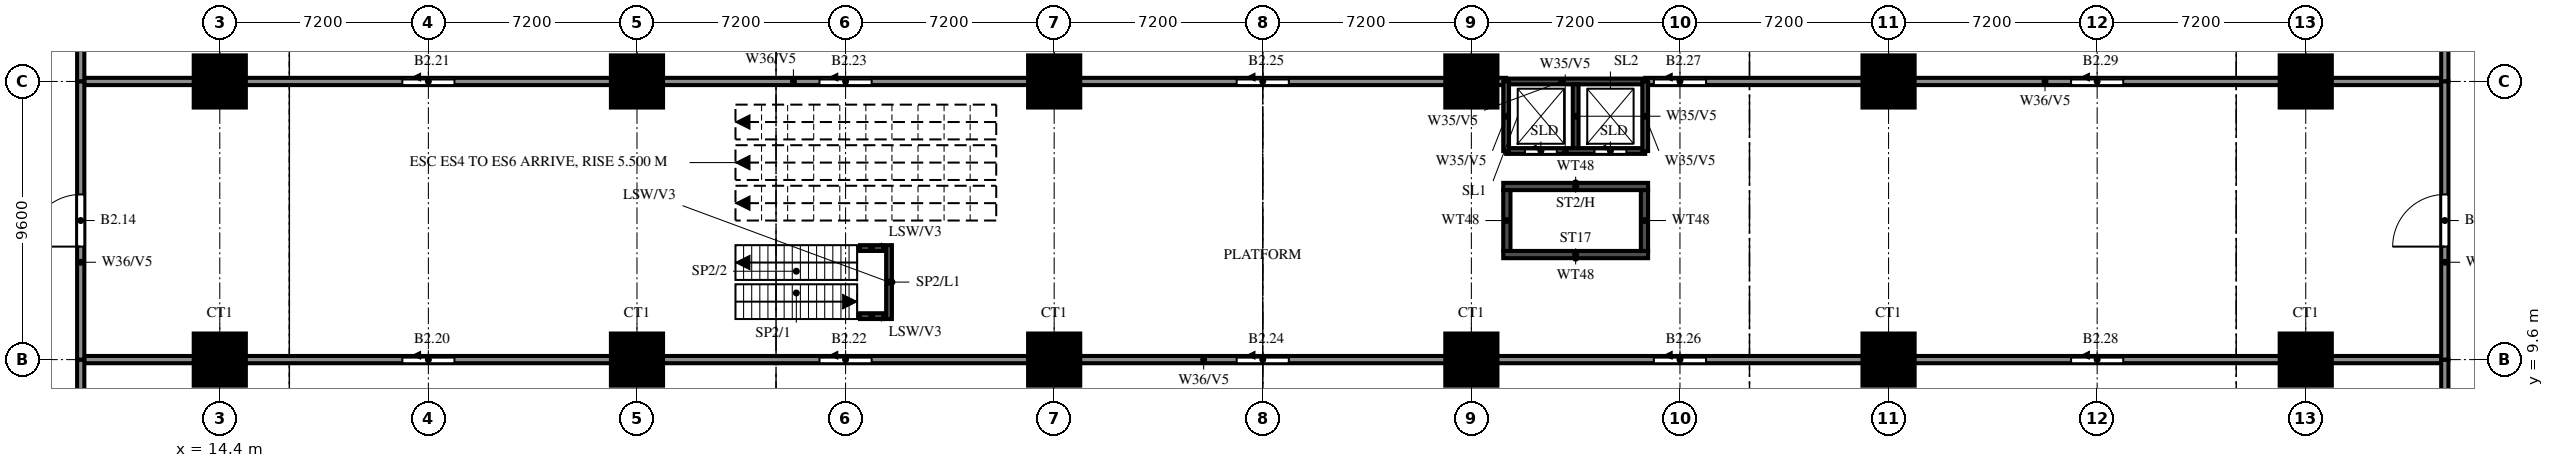
"""IFC4 building model, lengths in metres.
Left out: names, types, materials, properties, quantities, classifications, styles, units other than length and angle.
Written with IfcOpenShell. Run it as: python <this file> out.ifc"""

import sys

from ifc_helpers import new_model, si_unit, direction, frame, frame_2d, origin, origin_2d, place, context, subcontext, project, spatial, rectangle, extrude, source, transform, mapped, element, fill, save


model = new_model("IFC4")
c1 = context("Model", 3, precision=1e-05, world=origin(), true_north=direction((0.0, 1.0)))
c2 = subcontext(c1, "Body", "Model", "MODEL_VIEW")
j1 = project(units=[si_unit("LENGTHUNIT", "METRE"), si_unit("PLANEANGLEUNIT", "RADIAN")], contexts=[c1])
p1 = place(None, origin())
s1 = spatial("IfcSite", under=j1, at=p1, CompositionType="ELEMENT")
p2 = place(p1, origin())
s2 = spatial("IfcBuilding", under=s1, at=p2, CompositionType="ELEMENT")
p3 = place(p2, frame((0.0, 0.0, -11.4)))
s3 = spatial("IfcBuildingStorey", under=s2, at=p3, CompositionType="ELEMENT", Elevation=-11.4)
m1 = source(origin(), c2, "Body", "SweptSolid", [
    extrude(rectangle(XDim=1.8, YDim=1.8, at=origin_2d()), origin(), (0.0, 0.0, 1.0), 5.6),
])
for number, where, z_axis, x_axis in (
    (1, (14.4, 9.6, 0.0), (0.0, 0.0, 1.0), (1.0, 0.0, 0.0)),
    (2, (28.8, 9.6, 0.0), (0.0, 0.0, 1.0), (1.0, 0.0, 0.0)),
    (3, (43.2, 9.6, 0.0), (0.0, 0.0, 1.0), (1.0, 0.0, 0.0)),
    (4, (57.6, 9.6, 0.0), (0.0, 0.0, 1.0), (1.0, 0.0, 0.0)),
    (5, (72.0, 9.6, 0.0), (0.0, 0.0, 1.0), (1.0, 0.0, 0.0)),
    (6, (86.4, 9.6, 0.0), (0.0, 0.0, 1.0), (1.0, 0.0, 0.0)),
    (7, (14.4, 19.2, 0.0), (0.0, 0.0, 1.0), (1.0, 0.0, 0.0)),
    (8, (28.8, 19.2, 0.0), (0.0, 0.0, 1.0), (1.0, 0.0, 0.0)),
    (9, (43.2, 19.2, 0.0), (0.0, 0.0, 1.0), (1.0, 0.0, 0.0)),
    (10, (57.6, 19.2, 0.0), (0.0, 0.0, 1.0), (1.0, 0.0, 0.0)),
    (11, (72.0, 19.2, 0.0), (0.0, 0.0, 1.0), (1.0, 0.0, 0.0)),
    (12, (86.4, 19.2, 0.0), (0.0, 0.0, 1.0), (1.0, 0.0, 0.0)),
):
    element("IfcColumn", number, at=place(p3, frame(where, z_axis=z_axis, x_axis=x_axis)), inside=s3, PredefinedType="COLUMN", context=c2, shape_type="MappedRepresentation", body=[
        mapped(m1, transform((0.0, 0.0, 0.0))),
    ])
for number, where, z_axis, x_axis in (
    (13, (58.7, 13.225, -1.4), (0.0, 0.0, 1.0), (1.0, 0.0, 0.0)),
    (14, (58.7, 15.575, -1.4), (0.0, 0.0, 1.0), (1.0, 0.0, 0.0)),
):
    element("IfcWall", number, at=place(p3, frame(where, z_axis=z_axis, x_axis=x_axis)), inside=s3, PredefinedType="SHEAR", context=c2, shape_type="SweptSolid", body=[
        extrude(rectangle(XDim=5.0, YDim=0.25, at=frame_2d((2.5, 0.0))), origin(), (0.0, 0.0, 1.0), 1.4),
    ])
for number, where, z_axis, x_axis in (
    (15, (58.825, 13.35, -1.4), (0.0, 0.0, 1.0), (0.0, 1.0, 0.0)),
    (16, (63.575, 13.35, -1.4), (0.0, 0.0, 1.0), (0.0, 1.0, 0.0)),
):
    element("IfcWall", number, at=place(p3, frame(where, z_axis=z_axis, x_axis=x_axis)), inside=s3, PredefinedType="SHEAR", context=c2, shape_type="SweptSolid", body=[
        extrude(rectangle(XDim=2.1, YDim=0.25, at=frame_2d((1.05, 0.0))), origin(), (0.0, 0.0, 1.0), 1.4),
    ])
for number, where, z_axis, x_axis in (
    (17, (36.5, 11.1, 0.0), (0.0, 0.0, 1.0), (1.0, 0.0, 0.0)),
    (18, (36.5, 13.45, 0.0), (0.0, 0.0, 1.0), (1.0, 0.0, 0.0)),
):
    element("IfcWall", number, at=place(p3, frame(where, z_axis=z_axis, x_axis=x_axis)), inside=s3, PredefinedType="SOLIDWALL", context=c2, shape_type="SweptSolid", body=[
        extrude(rectangle(XDim=0.8, YDim=0.2, at=frame_2d((0.4, 0.0))), origin(), (0.0, 0.0, 1.0), 2.8),
    ])
p4 = place(p3, frame((37.5, 11.0, 0.0), z_axis=(0.0, 0.0, 1.0), x_axis=(0.0, 1.0, 0.0)))
e19 = element("IfcWall", 19, at=p4, inside=s3, PredefinedType="SOLIDWALL", context=c2, shape_type="SweptSolid", body=[
    extrude(rectangle(XDim=2.55, YDim=0.2, at=frame_2d((1.275, 0.0))), origin(), (0.0, 0.0, 1.0), 2.8),
])
p5 = place(p3, frame((9.6, 9.6, 0.0), z_axis=(0.0, 0.0, 1.0), x_axis=(1.0, 0.0, 0.0)))
e20 = element("IfcWall", 20, at=p5, inside=s3, PredefinedType="SOLIDWALL", context=c2, shape_type="SweptSolid", body=[
    extrude(rectangle(XDim=81.6, YDim=0.25, at=frame_2d((40.8, 0.0))), origin(), (0.0, 0.0, 1.0), 2.2),
])
p6 = place(p5, frame((11.1, 0.0, 0.0)))
e21 = element("IfcOpeningElement", 21, at=p6, cuts=e20, PredefinedType="OPENING", context=c2, shape_type="SweptSolid", body=[
    extrude(rectangle(XDim=1.8, YDim=2.1, at=frame_2d((0.9, 1.05))), frame((0.0, 0.135, 0.0), z_axis=(0.0, -1.0, 0.0), x_axis=(1.0, 0.0, 0.0)), (0.0, 0.0, 1.0), 0.27),
])
p7 = place(p5, frame((25.5, 0.0, 0.0)))
e22 = element("IfcOpeningElement", 22, at=p7, cuts=e20, PredefinedType="OPENING", context=c2, shape_type="SweptSolid", body=[
    extrude(rectangle(XDim=1.8, YDim=2.1, at=frame_2d((0.9, 1.05))), frame((0.0, 0.135, 0.0), z_axis=(0.0, -1.0, 0.0), x_axis=(1.0, 0.0, 0.0)), (0.0, 0.0, 1.0), 0.27),
])
p8 = place(p5, frame((39.9, 0.0, 0.0)))
e23 = element("IfcOpeningElement", 23, at=p8, cuts=e20, PredefinedType="OPENING", context=c2, shape_type="SweptSolid", body=[
    extrude(rectangle(XDim=1.8, YDim=2.1, at=frame_2d((0.9, 1.05))), frame((0.0, 0.135, 0.0), z_axis=(0.0, -1.0, 0.0), x_axis=(1.0, 0.0, 0.0)), (0.0, 0.0, 1.0), 0.27),
])
p9 = place(p5, frame((54.3, 0.0, 0.0)))
e24 = element("IfcOpeningElement", 24, at=p9, cuts=e20, PredefinedType="OPENING", context=c2, shape_type="SweptSolid", body=[
    extrude(rectangle(XDim=1.8, YDim=2.1, at=frame_2d((0.9, 1.05))), frame((0.0, 0.135, 0.0), z_axis=(0.0, -1.0, 0.0), x_axis=(1.0, 0.0, 0.0)), (0.0, 0.0, 1.0), 0.27),
])
p10 = place(p5, frame((68.7, 0.0, 0.0)))
e25 = element("IfcOpeningElement", 25, at=p10, cuts=e20, PredefinedType="OPENING", context=c2, shape_type="SweptSolid", body=[
    extrude(rectangle(XDim=1.8, YDim=2.1, at=frame_2d((0.9, 1.05))), frame((0.0, 0.135, 0.0), z_axis=(0.0, -1.0, 0.0), x_axis=(1.0, 0.0, 0.0)), (0.0, 0.0, 1.0), 0.27),
])
p11 = place(p3, frame((58.8, 16.8, 0.0), z_axis=(0.0, 0.0, 1.0), x_axis=(1.0, 0.0, 0.0)))
e26 = element("IfcWall", 26, at=p11, inside=s3, PredefinedType="SOLIDWALL", context=c2, shape_type="SweptSolid", body=[
    extrude(rectangle(XDim=4.8, YDim=0.2, at=frame_2d((2.4, 0.0))), origin(), (0.0, 0.0, 1.0), 5.6),
])
p12 = place(p11, frame((0.65, 0.0, 0.0)))
e27 = element("IfcOpeningElement", 27, at=p12, cuts=e26, PredefinedType="OPENING", context=c2, shape_type="SweptSolid", body=[
    extrude(rectangle(XDim=1.1, YDim=2.1, at=frame_2d((0.55, 1.05))), frame((0.0, 0.11, 0.0), z_axis=(0.0, -1.0, 0.0), x_axis=(1.0, 0.0, 0.0)), (0.0, 0.0, 1.0), 0.22),
])
p13 = place(p11, frame((3.05, 0.0, 0.0)))
e28 = element("IfcOpeningElement", 28, at=p13, cuts=e26, PredefinedType="OPENING", context=c2, shape_type="SweptSolid", body=[
    extrude(rectangle(XDim=1.1, YDim=2.1, at=frame_2d((0.55, 1.05))), frame((0.0, 0.11, 0.0), z_axis=(0.0, -1.0, 0.0), x_axis=(1.0, 0.0, 0.0)), (0.0, 0.0, 1.0), 0.22),
])
p14 = place(p3, frame((58.8, 19.2, 0.0), z_axis=(0.0, 0.0, 1.0), x_axis=(1.0, 0.0, 0.0)))
e29 = element("IfcWall", 29, at=p14, inside=s3, PredefinedType="SOLIDWALL", context=c2, shape_type="SweptSolid", body=[
    extrude(rectangle(XDim=4.8, YDim=0.2, at=frame_2d((2.4, 0.0))), origin(), (0.0, 0.0, 1.0), 5.6),
])
p15 = place(p3, frame((9.6, 19.2, 0.0), z_axis=(0.0, 0.0, 1.0), x_axis=(1.0, 0.0, 0.0)))
e30 = element("IfcWall", 30, at=p15, inside=s3, PredefinedType="SOLIDWALL", context=c2, shape_type="SweptSolid", body=[
    extrude(rectangle(XDim=49.2, YDim=0.25, at=frame_2d((24.6, 0.0))), origin(), (0.0, 0.0, 1.0), 2.2),
])
p16 = place(p15, frame((11.1, 0.0, 0.0)))
e31 = element("IfcOpeningElement", 31, at=p16, cuts=e30, PredefinedType="OPENING", context=c2, shape_type="SweptSolid", body=[
    extrude(rectangle(XDim=1.8, YDim=2.1, at=frame_2d((0.9, 1.05))), frame((0.0, 0.135, 0.0), z_axis=(0.0, -1.0, 0.0), x_axis=(1.0, 0.0, 0.0)), (0.0, 0.0, 1.0), 0.27),
])
p17 = place(p15, frame((25.5, 0.0, 0.0)))
e32 = element("IfcOpeningElement", 32, at=p17, cuts=e30, PredefinedType="OPENING", context=c2, shape_type="SweptSolid", body=[
    extrude(rectangle(XDim=1.8, YDim=2.1, at=frame_2d((0.9, 1.05))), frame((0.0, 0.135, 0.0), z_axis=(0.0, -1.0, 0.0), x_axis=(1.0, 0.0, 0.0)), (0.0, 0.0, 1.0), 0.27),
])
p18 = place(p15, frame((39.9, 0.0, 0.0)))
e33 = element("IfcOpeningElement", 33, at=p18, cuts=e30, PredefinedType="OPENING", context=c2, shape_type="SweptSolid", body=[
    extrude(rectangle(XDim=1.8, YDim=2.1, at=frame_2d((0.9, 1.05))), frame((0.0, 0.135, 0.0), z_axis=(0.0, -1.0, 0.0), x_axis=(1.0, 0.0, 0.0)), (0.0, 0.0, 1.0), 0.27),
])
p19 = place(p3, frame((63.6, 19.2, 0.0), z_axis=(0.0, 0.0, 1.0), x_axis=(1.0, 0.0, 0.0)))
e34 = element("IfcWall", 34, at=p19, inside=s3, PredefinedType="SOLIDWALL", context=c2, shape_type="SweptSolid", body=[
    extrude(rectangle(XDim=27.6, YDim=0.25, at=frame_2d((13.8, 0.0))), origin(), (0.0, 0.0, 1.0), 2.2),
])
p20 = place(p19, frame((0.3, 0.0, 0.0)))
e35 = element("IfcOpeningElement", 35, at=p20, cuts=e34, PredefinedType="OPENING", context=c2, shape_type="SweptSolid", body=[
    extrude(rectangle(XDim=1.8, YDim=2.1, at=frame_2d((0.9, 1.05))), frame((0.0, 0.135, 0.0), z_axis=(0.0, -1.0, 0.0), x_axis=(1.0, 0.0, 0.0)), (0.0, 0.0, 1.0), 0.27),
])
p21 = place(p19, frame((14.7, 0.0, 0.0)))
e36 = element("IfcOpeningElement", 36, at=p21, cuts=e34, PredefinedType="OPENING", context=c2, shape_type="SweptSolid", body=[
    extrude(rectangle(XDim=1.8, YDim=2.1, at=frame_2d((0.9, 1.05))), frame((0.0, 0.135, 0.0), z_axis=(0.0, -1.0, 0.0), x_axis=(1.0, 0.0, 0.0)), (0.0, 0.0, 1.0), 0.27),
])
p22 = place(p3, frame((9.6, 0.2, 0.0), z_axis=(0.0, 0.0, 1.0), x_axis=(0.0, 1.0, 0.0)))
e37 = element("IfcWall", 37, at=p22, inside=s3, PredefinedType="SOLIDWALL", context=c2, shape_type="SweptSolid", body=[
    extrude(rectangle(XDim=9.4, YDim=0.25, at=frame_2d((4.7, 0.0))), origin(), (0.0, 0.0, 1.0), 2.2),
])
p23 = place(p3, frame((9.6, 19.2, 0.0), z_axis=(0.0, 0.0, 1.0), x_axis=(0.0, 1.0, 0.0)))
e38 = element("IfcWall", 38, at=p23, inside=s3, PredefinedType="SOLIDWALL", context=c2, shape_type="SweptSolid", body=[
    extrude(rectangle(XDim=4.8, YDim=0.25, at=frame_2d((2.4, 0.0))), origin(), (0.0, 0.0, 1.0), 2.2),
])
p24 = place(p3, frame((9.6, 9.6, 0.0), z_axis=(0.0, 0.0, 1.0), x_axis=(0.0, 1.0, 0.0)))
e39 = element("IfcWall", 39, at=p24, inside=s3, PredefinedType="SOLIDWALL", context=c2, shape_type="SweptSolid", body=[
    extrude(rectangle(XDim=9.6, YDim=0.25, at=frame_2d((4.8, 0.0))), origin(), (0.0, 0.0, 1.0), 2.2),
])
p25 = place(p24, frame((3.9, 0.0, 0.0)))
e40 = element("IfcOpeningElement", 40, at=p25, cuts=e39, PredefinedType="OPENING", context=c2, shape_type="SweptSolid", body=[
    extrude(rectangle(XDim=1.8, YDim=2.1, at=frame_2d((0.9, 1.05))), frame((0.0, 0.135, 0.0), z_axis=(0.0, -1.0, 0.0), x_axis=(1.0, 0.0, 0.0)), (0.0, 0.0, 1.0), 0.27),
])
p26 = place(p3, frame((58.8, 16.8, 0.0), z_axis=(0.0, 0.0, 1.0), x_axis=(0.0, 1.0, 0.0)))
e41 = element("IfcWall", 41, at=p26, inside=s3, PredefinedType="SOLIDWALL", context=c2, shape_type="SweptSolid", body=[
    extrude(rectangle(XDim=2.4, YDim=0.2, at=frame_2d((1.2, 0.0))), origin(), (0.0, 0.0, 1.0), 5.6),
])
p27 = place(p3, frame((61.2, 16.9, 0.0), z_axis=(0.0, 0.0, 1.0), x_axis=(0.0, 1.0, 0.0)))
e42 = element("IfcWall", 42, at=p27, inside=s3, PredefinedType="SOLIDWALL", context=c2, shape_type="SweptSolid", body=[
    extrude(rectangle(XDim=2.2, YDim=0.2, at=frame_2d((1.1, 0.0))), origin(), (0.0, 0.0, 1.0), 5.6),
])
p28 = place(p3, frame((63.6, 16.8, 0.0), z_axis=(0.0, 0.0, 1.0), x_axis=(0.0, 1.0, 0.0)))
e43 = element("IfcWall", 43, at=p28, inside=s3, PredefinedType="SOLIDWALL", context=c2, shape_type="SweptSolid", body=[
    extrude(rectangle(XDim=2.4, YDim=0.2, at=frame_2d((1.2, 0.0))), origin(), (0.0, 0.0, 1.0), 5.6),
])
p29 = place(p3, frame((91.2, 0.2, 0.0), z_axis=(0.0, 0.0, 1.0), x_axis=(0.0, 1.0, 0.0)))
e44 = element("IfcWall", 44, at=p29, inside=s3, PredefinedType="SOLIDWALL", context=c2, shape_type="SweptSolid", body=[
    extrude(rectangle(XDim=9.4, YDim=0.25, at=frame_2d((4.7, 0.0))), origin(), (0.0, 0.0, 1.0), 2.2),
])
p30 = place(p3, frame((91.2, 19.2, 0.0), z_axis=(0.0, 0.0, 1.0), x_axis=(0.0, 1.0, 0.0)))
e45 = element("IfcWall", 45, at=p30, inside=s3, PredefinedType="SOLIDWALL", context=c2, shape_type="SweptSolid", body=[
    extrude(rectangle(XDim=4.8, YDim=0.25, at=frame_2d((2.4, 0.0))), origin(), (0.0, 0.0, 1.0), 2.2),
])
p31 = place(p3, frame((91.2, 9.6, 0.0), z_axis=(0.0, 0.0, 1.0), x_axis=(0.0, 1.0, 0.0)))
e46 = element("IfcWall", 46, at=p31, inside=s3, PredefinedType="SOLIDWALL", context=c2, shape_type="SweptSolid", body=[
    extrude(rectangle(XDim=9.6, YDim=0.25, at=frame_2d((4.8, 0.0))), origin(), (0.0, 0.0, 1.0), 2.2),
])
p32 = place(p31, frame((3.9, 0.0, 0.0)))
e47 = element("IfcOpeningElement", 47, at=p32, cuts=e46, PredefinedType="OPENING", context=c2, shape_type="SweptSolid", body=[
    extrude(rectangle(XDim=1.8, YDim=2.1, at=frame_2d((0.9, 1.05))), frame((0.0, 0.135, 0.0), z_axis=(0.0, -1.0, 0.0), x_axis=(1.0, 0.0, 0.0)), (0.0, 0.0, 1.0), 0.27),
])
p33 = place(p12, origin())
e48 = element("IfcDoor", 48, at=p33, inside=s3, OperationType="SLIDING_TO_LEFT", PredefinedType="DOOR", context=c2, shape_type="SweptSolid", body=[
    extrude(rectangle(XDim=1.1, YDim=2.1, at=frame_2d((0.55, 1.05))), frame((0.0, 0.025, 0.0), z_axis=(0.0, -1.0, 0.0), x_axis=(1.0, 0.0, 0.0)), (0.0, 0.0, 1.0), 0.05),
])
fill(e27, e48)
p34 = place(p13, origin())
e49 = element("IfcDoor", 49, at=p34, inside=s3, OperationType="SLIDING_TO_LEFT", PredefinedType="DOOR", context=c2, shape_type="SweptSolid", body=[
    extrude(rectangle(XDim=1.1, YDim=2.1, at=frame_2d((0.55, 1.05))), frame((0.0, 0.025, 0.0), z_axis=(0.0, -1.0, 0.0), x_axis=(1.0, 0.0, 0.0)), (0.0, 0.0, 1.0), 0.05),
])
fill(e28, e49)
p35 = place(p25, origin())
e50 = element("IfcDoor", 50, at=p35, inside=s3, OperationType="DOUBLE_DOOR_SINGLE_SWING", PredefinedType="DOOR", context=c2, shape_type="SweptSolid", body=[
    extrude(rectangle(XDim=1.8, YDim=2.1, at=frame_2d((0.9, 1.05))), frame((0.0, 0.025, 0.0), z_axis=(0.0, -1.0, 0.0), x_axis=(1.0, 0.0, 0.0)), (0.0, 0.0, 1.0), 0.05),
])
fill(e40, e50)
p36 = place(p32, origin())
e51 = element("IfcDoor", 51, at=p36, inside=s3, OperationType="DOUBLE_DOOR_SINGLE_SWING", PredefinedType="DOOR", context=c2, shape_type="SweptSolid", body=[
    extrude(rectangle(XDim=1.8, YDim=2.1, at=frame_2d((0.9, 1.05))), frame((0.0, 0.025, 0.0), z_axis=(0.0, -1.0, 0.0), x_axis=(1.0, 0.0, 0.0)), (0.0, 0.0, 1.0), 0.05),
])
fill(e47, e51)
p37 = place(p6, origin())
e52 = element("IfcDoor", 52, at=p37, inside=s3, OperationType="SLIDING_TO_LEFT", PredefinedType="DOOR", context=c2, shape_type="SweptSolid", body=[
    extrude(rectangle(XDim=1.8, YDim=2.1, at=frame_2d((0.9, 1.05))), frame((0.0, 0.025, 0.0), z_axis=(0.0, -1.0, 0.0), x_axis=(1.0, 0.0, 0.0)), (0.0, 0.0, 1.0), 0.05),
])
fill(e21, e52)
p38 = place(p16, origin())
e53 = element("IfcDoor", 53, at=p38, inside=s3, OperationType="SLIDING_TO_LEFT", PredefinedType="DOOR", context=c2, shape_type="SweptSolid", body=[
    extrude(rectangle(XDim=1.8, YDim=2.1, at=frame_2d((0.9, 1.05))), frame((0.0, 0.025, 0.0), z_axis=(0.0, -1.0, 0.0), x_axis=(1.0, 0.0, 0.0)), (0.0, 0.0, 1.0), 0.05),
])
fill(e31, e53)
p39 = place(p7, origin())
e54 = element("IfcDoor", 54, at=p39, inside=s3, OperationType="SLIDING_TO_LEFT", PredefinedType="DOOR", context=c2, shape_type="SweptSolid", body=[
    extrude(rectangle(XDim=1.8, YDim=2.1, at=frame_2d((0.9, 1.05))), frame((0.0, 0.025, 0.0), z_axis=(0.0, -1.0, 0.0), x_axis=(1.0, 0.0, 0.0)), (0.0, 0.0, 1.0), 0.05),
])
fill(e22, e54)
p40 = place(p17, origin())
e55 = element("IfcDoor", 55, at=p40, inside=s3, OperationType="SLIDING_TO_LEFT", PredefinedType="DOOR", context=c2, shape_type="SweptSolid", body=[
    extrude(rectangle(XDim=1.8, YDim=2.1, at=frame_2d((0.9, 1.05))), frame((0.0, 0.025, 0.0), z_axis=(0.0, -1.0, 0.0), x_axis=(1.0, 0.0, 0.0)), (0.0, 0.0, 1.0), 0.05),
])
fill(e32, e55)
p41 = place(p8, origin())
e56 = element("IfcDoor", 56, at=p41, inside=s3, OperationType="SLIDING_TO_LEFT", PredefinedType="DOOR", context=c2, shape_type="SweptSolid", body=[
    extrude(rectangle(XDim=1.8, YDim=2.1, at=frame_2d((0.9, 1.05))), frame((0.0, 0.025, 0.0), z_axis=(0.0, -1.0, 0.0), x_axis=(1.0, 0.0, 0.0)), (0.0, 0.0, 1.0), 0.05),
])
fill(e23, e56)
p42 = place(p18, origin())
e57 = element("IfcDoor", 57, at=p42, inside=s3, OperationType="SLIDING_TO_LEFT", PredefinedType="DOOR", context=c2, shape_type="SweptSolid", body=[
    extrude(rectangle(XDim=1.8, YDim=2.1, at=frame_2d((0.9, 1.05))), frame((0.0, 0.025, 0.0), z_axis=(0.0, -1.0, 0.0), x_axis=(1.0, 0.0, 0.0)), (0.0, 0.0, 1.0), 0.05),
])
fill(e33, e57)
p43 = place(p9, origin())
e58 = element("IfcDoor", 58, at=p43, inside=s3, OperationType="SLIDING_TO_LEFT", PredefinedType="DOOR", context=c2, shape_type="SweptSolid", body=[
    extrude(rectangle(XDim=1.8, YDim=2.1, at=frame_2d((0.9, 1.05))), frame((0.0, 0.025, 0.0), z_axis=(0.0, -1.0, 0.0), x_axis=(1.0, 0.0, 0.0)), (0.0, 0.0, 1.0), 0.05),
])
fill(e24, e58)
p44 = place(p20, origin())
e59 = element("IfcDoor", 59, at=p44, inside=s3, OperationType="SLIDING_TO_LEFT", PredefinedType="DOOR", context=c2, shape_type="SweptSolid", body=[
    extrude(rectangle(XDim=1.8, YDim=2.1, at=frame_2d((0.9, 1.05))), frame((0.0, 0.025, 0.0), z_axis=(0.0, -1.0, 0.0), x_axis=(1.0, 0.0, 0.0)), (0.0, 0.0, 1.0), 0.05),
])
fill(e35, e59)
p45 = place(p10, origin())
e60 = element("IfcDoor", 60, at=p45, inside=s3, OperationType="SLIDING_TO_LEFT", PredefinedType="DOOR", context=c2, shape_type="SweptSolid", body=[
    extrude(rectangle(XDim=1.8, YDim=2.1, at=frame_2d((0.9, 1.05))), frame((0.0, 0.025, 0.0), z_axis=(0.0, -1.0, 0.0), x_axis=(1.0, 0.0, 0.0)), (0.0, 0.0, 1.0), 0.05),
])
fill(e25, e60)
p46 = place(p21, origin())
e61 = element("IfcDoor", 61, at=p46, inside=s3, OperationType="SLIDING_TO_LEFT", PredefinedType="DOOR", context=c2, shape_type="SweptSolid", body=[
    extrude(rectangle(XDim=1.8, YDim=2.1, at=frame_2d((0.9, 1.05))), frame((0.0, 0.025, 0.0), z_axis=(0.0, -1.0, 0.0), x_axis=(1.0, 0.0, 0.0)), (0.0, 0.0, 1.0), 0.05),
])
fill(e36, e61)
save(model, sys.argv[1])
